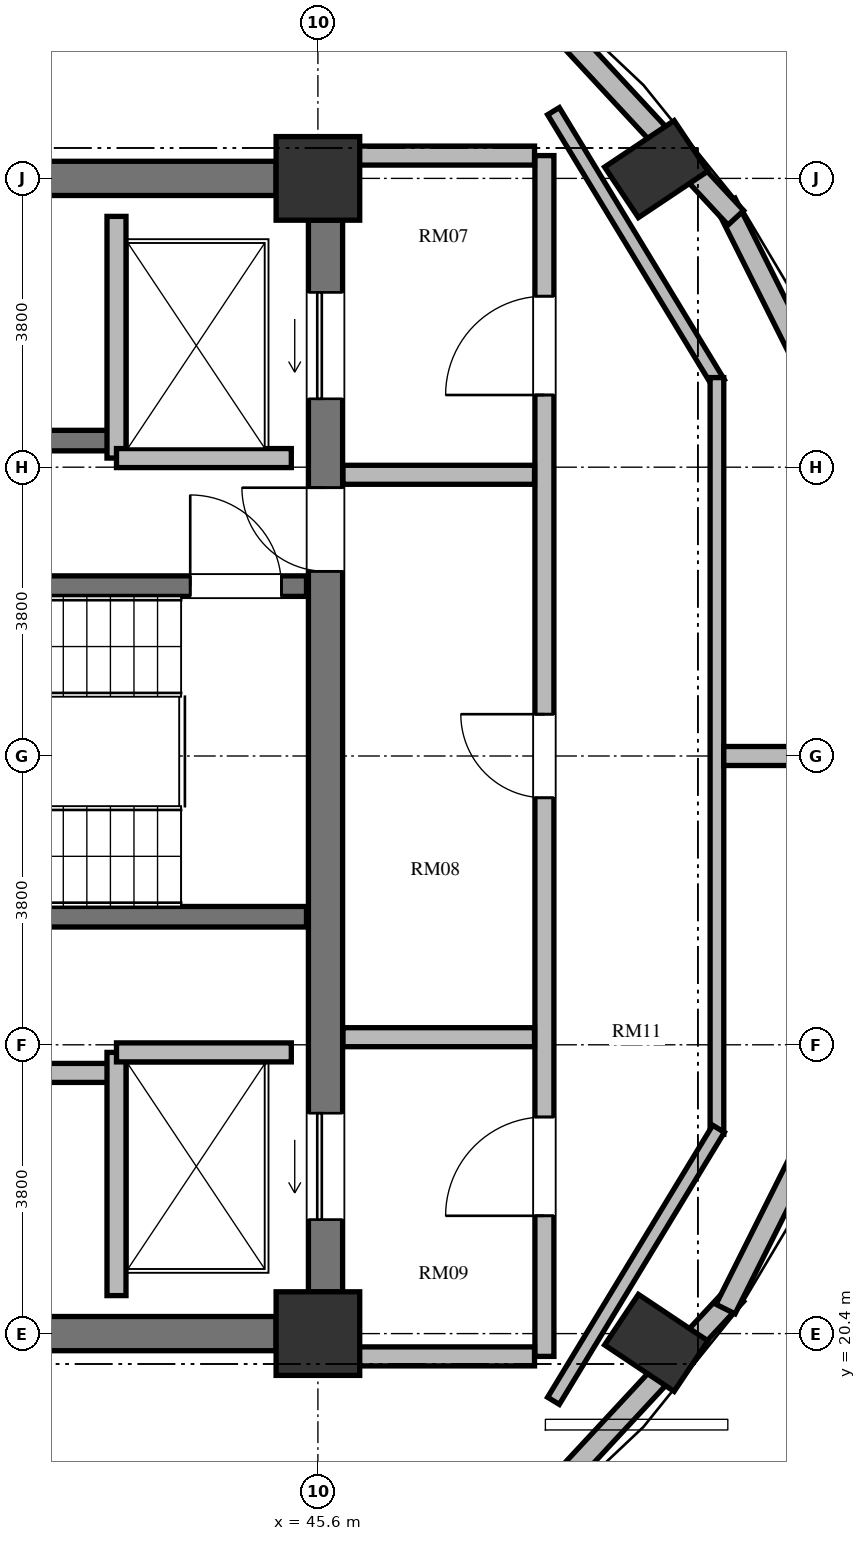
"""IFC4 building model, lengths in metres.
Left out: names, types, materials, properties, quantities, classifications, styles, units other than length and angle.
Written with IfcOpenShell. Run it as: python <this file> out.ifc"""

import sys

from ifc_helpers import new_model, si_unit, direction, frame, frame_2d, origin, origin_2d, place, context, subcontext, project, spatial, rectangle, extrude, element, fill, save


model = new_model("IFC4")
c1 = context("Model", 3, precision=1e-05, world=origin(), true_north=direction((0.0, 1.0)))
c2 = subcontext(c1, "Body", "Model", "MODEL_VIEW")
j1 = project(units=[si_unit("LENGTHUNIT", "METRE"), si_unit("PLANEANGLEUNIT", "RADIAN")], contexts=[c1])
p1 = place(None, origin())
s1 = spatial("IfcSite", under=j1, at=p1, CompositionType="ELEMENT")
p2 = place(p1, origin())
s2 = spatial("IfcBuilding", under=s1, at=p2, CompositionType="ELEMENT")
p3 = place(p2, frame((0.0, 0.0, 305.836)))
s3 = spatial("IfcBuildingStorey", under=s2, at=p3, CompositionType="ELEMENT", Elevation=305.836)
for number, where, z_axis, x_axis in (
    (1, (50.052, 20.278, 0.0), (0.0, 0.0, 1.0), (0.831, -0.556, 0.0)),
    (2, (50.052, 35.722, 0.0), (0.0, 0.0, 1.0), (0.831, 0.556, 0.0)),
):
    element("IfcColumn", number, at=place(p3, frame(where, z_axis=z_axis, x_axis=x_axis)), inside=s3, PredefinedType="COLUMN", context=c2, shape_type="SweptSolid", body=[
        extrude(rectangle(XDim=1.1, YDim=0.8, at=origin_2d()), origin(), (0.0, 0.0, 1.0), 3.388),
    ])
for number, where, z_axis, x_axis in (
    (3, (45.6, 20.4, 0.0), (0.0, 0.0, 1.0), (1.0, 0.0, 0.0)),
    (4, (45.6, 35.6, 0.0), (0.0, 0.0, 1.0), (1.0, 0.0, 0.0)),
):
    element("IfcColumn", number, at=place(p3, frame(where, z_axis=z_axis, x_axis=x_axis)), inside=s3, PredefinedType="COLUMN", context=c2, shape_type="SweptSolid", body=[
        extrude(rectangle(XDim=1.1, YDim=1.1, at=origin_2d()), origin(), (0.0, 0.0, 1.0), 3.388),
    ])
p4 = place(p3, frame((45.7, 20.95, 0.0), z_axis=(0.0, 0.0, 1.0), x_axis=(0.0, 1.0, 0.0)))
e5 = element("IfcWall", 5, at=p4, inside=s3, PredefinedType="SHEAR", context=c2, shape_type="SweptSolid", body=[
    extrude(rectangle(XDim=14.1, YDim=0.45, at=frame_2d((7.05, 0.0))), origin(), (0.0, 0.0, 1.0), 3.388),
])
p5 = place(p4, frame((11.75, 0.0, 0.0)))
e6 = element("IfcOpeningElement", 6, at=p5, cuts=e5, PredefinedType="OPENING", context=c2, shape_type="SweptSolid", body=[
    extrude(rectangle(XDim=1.4, YDim=2.3, at=frame_2d((0.7, 1.15))), frame((0.0, 0.235, 0.0), z_axis=(0.0, -1.0, 0.0), x_axis=(1.0, 0.0, 0.0)), (0.0, 0.0, 1.0), 0.47),
])
p6 = place(p4, frame((0.95, 0.0, 0.0)))
e7 = element("IfcOpeningElement", 7, at=p6, cuts=e5, PredefinedType="OPENING", context=c2, shape_type="SweptSolid", body=[
    extrude(rectangle(XDim=1.4, YDim=2.3, at=frame_2d((0.7, 1.15))), frame((0.0, 0.235, 0.0), z_axis=(0.0, -1.0, 0.0), x_axis=(1.0, 0.0, 0.0)), (0.0, 0.0, 1.0), 0.47),
])
p7 = place(p4, frame((9.48, 0.0, 0.0)))
e8 = element("IfcOpeningElement", 8, at=p7, cuts=e5, PredefinedType="OPENING", context=c2, shape_type="SweptSolid", body=[
    extrude(rectangle(XDim=1.1, YDim=2.15, at=frame_2d((0.55, 1.075))), frame((0.0, 0.235, 0.0), z_axis=(0.0, -1.0, 0.0), x_axis=(1.0, 0.0, 0.0)), (0.0, 0.0, 1.0), 0.47),
])
for number, where, z_axis, x_axis in (
    (9, (39.6, 20.4, 0.0), (0.0, 0.0, 1.0), (1.0, 0.0, 0.0)),
    (10, (39.6, 35.6, 0.0), (0.0, 0.0, 1.0), (1.0, 0.0, 0.0)),
):
    element("IfcWall", number, at=place(p3, frame(where, z_axis=z_axis, x_axis=x_axis)), inside=s3, PredefinedType="SHEAR", context=c2, shape_type="SweptSolid", body=[
        extrude(rectangle(XDim=5.45, YDim=0.45, at=frame_2d((2.725, 0.0))), origin(), (0.0, 0.0, 1.0), 3.388),
    ])
p8 = place(p3, frame((48.18, 17.772, 0.0), z_axis=(0.0, 0.0, 1.0), x_axis=(0.680156447476, 0.733066986678, 0.0)))
e11 = element("IfcWall", 11, at=p8, inside=s3, PredefinedType="SOLIDWALL", context=c2, shape_type="SweptSolid", body=[
    extrude(rectangle(XDim=4.291, YDim=0.28, at=frame_2d((2.146, 0.0))), origin(), (0.0, 0.0, 1.0), 3.068),
])
for number, where, z_axis, x_axis in (
    (12, (50.963, 20.723, 0.0), (0.0, 0.0, 1.0), (0.448, 0.894, 0.0)),
    (13, (52.803, 31.604, 0.0), (0.0, 0.0, 1.0), (-0.448, 0.894, 0.0)),
):
    element("IfcWall", number, at=place(p3, frame(where, z_axis=z_axis, x_axis=x_axis)), inside=s3, PredefinedType="SOLIDWALL", context=c2, shape_type="SweptSolid", body=[
        extrude(rectangle(XDim=4.108, YDim=0.28, at=frame_2d((2.054, 0.0))), origin(), (0.0, 0.0, 1.0), 3.068),
    ])
p9 = place(p3, frame((51.098, 35.082, 0.0), z_axis=(0.0, 0.0, 1.0), x_axis=(-0.680156447476, 0.733066986678, 0.0)))
e14 = element("IfcWall", 14, at=p9, inside=s3, PredefinedType="SOLIDWALL", context=c2, shape_type="SweptSolid", body=[
    extrude(rectangle(XDim=4.291, YDim=0.28, at=frame_2d((2.146, 0.0))), origin(), (0.0, 0.0, 1.0), 3.068),
])
p10 = place(p3, frame((37.465, 30.235, 0.0), z_axis=(0.0, 0.0, 1.0), x_axis=(1.0, 0.0, 0.0)))
e15 = element("IfcWall", 15, at=p10, inside=s3, PredefinedType="SHEAR", context=c2, shape_type="SweptSolid", body=[
    extrude(rectangle(XDim=7.985, YDim=0.27, at=frame_2d((3.992, 0.0))), origin(), (0.0, 0.0, 1.0), 3.388),
])
p11 = place(p10, frame((6.455, 0.0, 0.0)))
e16 = element("IfcOpeningElement", 16, at=p11, cuts=e15, PredefinedType="OPENING", context=c2, shape_type="SweptSolid", body=[
    extrude(rectangle(XDim=1.2, YDim=2.15, at=frame_2d((0.6, 1.075))), frame((0.0, 0.145, 0.0), z_axis=(0.0, -1.0, 0.0), x_axis=(1.0, 0.0, 0.0)), (0.0, 0.0, 1.0), 0.29),
])
p12 = place(p3, frame((37.465, 25.885, 0.0), z_axis=(0.0, 0.0, 1.0), x_axis=(1.0, 0.0, 0.0)))
e17 = element("IfcWall", 17, at=p12, inside=s3, PredefinedType="SHEAR", context=c2, shape_type="SweptSolid", body=[
    extrude(rectangle(XDim=7.985, YDim=0.27, at=frame_2d((3.992, 0.0))), origin(), (0.0, 0.0, 1.0), 3.388),
])
p13 = place(p3, frame((26.55, 32.15, 0.0), z_axis=(0.0, 0.0, 1.0), x_axis=(1.0, 0.0, 0.0)))
e18 = element("IfcWall", 18, at=p13, inside=s3, PredefinedType="SHEAR", context=c2, shape_type="SweptSolid", body=[
    extrude(rectangle(XDim=16.4, YDim=0.27, at=frame_2d((8.2, 0.0))), origin(), (0.0, 0.0, 1.0), 3.388),
])
p14 = place(p13, frame((4.9, 0.0, 0.0)))
e19 = element("IfcOpeningElement", 19, at=p14, cuts=e18, PredefinedType="OPENING", context=c2, shape_type="SweptSolid", body=[
    extrude(rectangle(XDim=1.1, YDim=2.15, at=frame_2d((0.55, 1.075))), frame((0.0, 0.145, 0.0), z_axis=(0.0, -1.0, 0.0), x_axis=(1.0, 0.0, 0.0)), (0.0, 0.0, 1.0), 0.29),
])
p15 = place(p13, frame((11.9, 0.0, 0.0)))
e20 = element("IfcOpeningElement", 20, at=p15, cuts=e18, PredefinedType="OPENING", context=c2, shape_type="SweptSolid", body=[
    extrude(rectangle(XDim=1.1, YDim=2.2, at=frame_2d((0.55, 1.1))), frame((0.0, 0.145, 0.0), z_axis=(0.0, -1.0, 0.0), x_axis=(1.0, 0.0, 0.0)), (0.0, 0.0, 1.0), 0.29),
])
p16 = place(p3, frame((26.75, 23.83, 0.0), z_axis=(0.0, 0.0, 1.0), x_axis=(1.0, 0.0, 0.0)))
e21 = element("IfcWall", 21, at=p16, inside=s3, PredefinedType="SOLIDWALL", context=c2, shape_type="SweptSolid", body=[
    extrude(rectangle(XDim=16.2, YDim=0.25, at=frame_2d((8.1, 0.0))), origin(), (0.0, 0.0, 1.0), 3.068),
])
p17 = place(p16, frame((7.7, 0.0, 0.0)))
e22 = element("IfcOpeningElement", 22, at=p17, cuts=e21, PredefinedType="OPENING", context=c2, shape_type="SweptSolid", body=[
    extrude(rectangle(XDim=1.1, YDim=2.15, at=frame_2d((0.55, 1.075))), frame((0.0, 0.135, 0.0), z_axis=(0.0, -1.0, 0.0), x_axis=(1.0, 0.0, 0.0)), (0.0, 0.0, 1.0), 0.27),
])
p18 = place(p3, frame((42.95, 31.92, 0.0), z_axis=(0.0, 0.0, 1.0), x_axis=(0.0, 1.0, 0.0)))
e23 = element("IfcWall", 23, at=p18, inside=s3, PredefinedType="SOLIDWALL", context=c2, shape_type="SweptSolid", body=[
    extrude(rectangle(XDim=3.18, YDim=0.25, at=frame_2d((1.59, 0.0))), origin(), (0.0, 0.0, 1.0), 3.068),
])
p19 = place(p3, frame((42.95, 31.92, 0.0), z_axis=(0.0, 0.0, 1.0), x_axis=(1.0, 0.0, 0.0)))
e24 = element("IfcWall", 24, at=p19, inside=s3, PredefinedType="SOLIDWALL", context=c2, shape_type="SweptSolid", body=[
    extrude(rectangle(XDim=2.3, YDim=0.25, at=frame_2d((1.15, 0.0))), origin(), (0.0, 0.0, 1.0), 3.068),
])
p20 = place(p3, frame((42.95, 20.9, 0.0), z_axis=(0.0, 0.0, 1.0), x_axis=(0.0, 1.0, 0.0)))
e25 = element("IfcWall", 25, at=p20, inside=s3, PredefinedType="SOLIDWALL", context=c2, shape_type="SweptSolid", body=[
    extrude(rectangle(XDim=3.2, YDim=0.25, at=frame_2d((1.6, 0.0))), origin(), (0.0, 0.0, 1.0), 3.068),
])
p21 = place(p3, frame((42.95, 24.1, 0.0), z_axis=(0.0, 0.0, 1.0), x_axis=(1.0, 0.0, 0.0)))
e26 = element("IfcWall", 26, at=p21, inside=s3, PredefinedType="SOLIDWALL", context=c2, shape_type="SweptSolid", body=[
    extrude(rectangle(XDim=2.3, YDim=0.25, at=frame_2d((1.15, 0.0))), origin(), (0.0, 0.0, 1.0), 3.068),
])
p22 = place(p3, frame((48.58, 20.1, 0.0), z_axis=(0.0, 0.0, 1.0), x_axis=(0.0, 1.0, 0.0)))
e27 = element("IfcWall", 27, at=p22, inside=s3, PredefinedType="SOLIDWALL", context=c2, shape_type="SweptSolid", body=[
    extrude(rectangle(XDim=15.8, YDim=0.25, at=frame_2d((7.9, 0.0))), origin(), (0.0, 0.0, 1.0), 3.068),
])
p23 = place(p22, frame((12.65, 0.0, 0.0)))
e28 = element("IfcOpeningElement", 28, at=p23, cuts=e27, PredefinedType="OPENING", context=c2, shape_type="SweptSolid", body=[
    extrude(rectangle(XDim=1.3, YDim=2.2, at=frame_2d((0.65, 1.1))), frame((0.0, 0.135, 0.0), z_axis=(0.0, -1.0, 0.0), x_axis=(1.0, 0.0, 0.0)), (0.0, 0.0, 1.0), 0.27),
])
p24 = place(p22, frame((7.35, 0.0, 0.0)))
e29 = element("IfcOpeningElement", 29, at=p24, cuts=e27, PredefinedType="OPENING", context=c2, shape_type="SweptSolid", body=[
    extrude(rectangle(XDim=1.1, YDim=2.15, at=frame_2d((0.55, 1.075))), frame((0.0, 0.135, 0.0), z_axis=(0.0, -1.0, 0.0), x_axis=(1.0, 0.0, 0.0)), (0.0, 0.0, 1.0), 0.27),
])
p25 = place(p22, frame((1.85, 0.0, 0.0)))
e30 = element("IfcOpeningElement", 30, at=p25, cuts=e27, PredefinedType="OPENING", context=c2, shape_type="SweptSolid", body=[
    extrude(rectangle(XDim=1.3, YDim=2.2, at=frame_2d((0.65, 1.1))), frame((0.0, 0.135, 0.0), z_axis=(0.0, -1.0, 0.0), x_axis=(1.0, 0.0, 0.0)), (0.0, 0.0, 1.0), 0.27),
])
for number, where, z_axis, x_axis in (
    (31, (45.93, 35.9, 0.0), (0.0, 0.0, 1.0), (1.0, 0.0, 0.0)),
    (32, (45.93, 31.7, 0.0), (0.0, 0.0, 1.0), (1.0, 0.0, 0.0)),
    (33, (45.93, 24.3, 0.0), (0.0, 0.0, 1.0), (1.0, 0.0, 0.0)),
    (34, (45.93, 20.1, 0.0), (0.0, 0.0, 1.0), (1.0, 0.0, 0.0)),
):
    element("IfcWall", number, at=place(p3, frame(where, z_axis=z_axis, x_axis=x_axis)), inside=s3, PredefinedType="SOLIDWALL", context=c2, shape_type="SweptSolid", body=[
        extrude(rectangle(XDim=2.52, YDim=0.25, at=frame_2d((1.26, 0.0))), origin(), (0.0, 0.0, 1.0), 3.068),
    ])
p26 = place(p3, frame((48.699, 36.485, 0.0), z_axis=(0.0, 0.0, 1.0), x_axis=(0.518614420457, -0.855008235571, 0.0)))
e35 = element("IfcWall", 35, at=p26, inside=s3, PredefinedType="PARTITIONING", context=c2, shape_type="SweptSolid", body=[
    extrude(rectangle(XDim=4.187, YDim=0.18, at=frame_2d((2.094, 0.0))), origin(), (0.0, 0.0, 1.0), 3.068),
])
p27 = place(p3, frame((50.85, 32.979, 0.0), z_axis=(0.0, 0.0, 1.0), x_axis=(0.0, -1.0, 0.0)))
e36 = element("IfcWall", 36, at=p27, inside=s3, PredefinedType="PARTITIONING", context=c2, shape_type="SweptSolid", body=[
    extrude(rectangle(XDim=9.958, YDim=0.18, at=frame_2d((4.979, 0.0))), origin(), (0.0, 0.0, 1.0), 3.068),
])
p28 = place(p3, frame((50.871, 23.095, 0.0), z_axis=(0.0, 0.0, 1.0), x_axis=(-0.518614420457, -0.855008235571, 0.0)))
e37 = element("IfcWall", 37, at=p28, inside=s3, PredefinedType="PARTITIONING", context=c2, shape_type="SweptSolid", body=[
    extrude(rectangle(XDim=4.187, YDim=0.18, at=frame_2d((2.094, 0.0))), origin(), (0.0, 0.0, 1.0), 3.068),
])
p29 = place(p3, frame((50.94, 28.0, 0.0), z_axis=(0.0, 0.0, 1.0), x_axis=(1.0, 0.0, 0.0)))
e38 = element("IfcWall", 38, at=p29, inside=s3, PredefinedType="SOLIDWALL", context=c2, shape_type="SweptSolid", body=[
    extrude(rectangle(XDim=2.365, YDim=0.25, at=frame_2d((1.183, 0.0))), origin(), (0.0, 0.0, 1.0), 3.068),
])
p30 = place(p11, origin())
e39 = element("IfcDoor", 39, at=p30, inside=s3, OperationType="SINGLE_SWING_LEFT", PredefinedType="DOOR", context=c2, shape_type="SweptSolid", body=[
    extrude(rectangle(XDim=1.2, YDim=2.15, at=frame_2d((0.6, 1.075))), frame((0.0, 0.025, 0.0), z_axis=(0.0, -1.0, 0.0), x_axis=(1.0, 0.0, 0.0)), (0.0, 0.0, 1.0), 0.05),
])
fill(e16, e39)
p31 = place(p5, origin())
e40 = element("IfcDoor", 40, at=p31, inside=s3, OperationType="SLIDING_TO_LEFT", PredefinedType="DOOR", context=c2, shape_type="SweptSolid", body=[
    extrude(rectangle(XDim=1.4, YDim=2.3, at=frame_2d((0.7, 1.15))), frame((0.0, 0.025, 0.0), z_axis=(0.0, -1.0, 0.0), x_axis=(1.0, 0.0, 0.0)), (0.0, 0.0, 1.0), 0.05),
])
fill(e6, e40)
p32 = place(p6, origin())
e41 = element("IfcDoor", 41, at=p32, inside=s3, OperationType="SLIDING_TO_LEFT", PredefinedType="DOOR", context=c2, shape_type="SweptSolid", body=[
    extrude(rectangle(XDim=1.4, YDim=2.3, at=frame_2d((0.7, 1.15))), frame((0.0, 0.025, 0.0), z_axis=(0.0, -1.0, 0.0), x_axis=(1.0, 0.0, 0.0)), (0.0, 0.0, 1.0), 0.05),
])
fill(e7, e41)
p33 = place(p7, origin())
e42 = element("IfcDoor", 42, at=p33, inside=s3, OperationType="SINGLE_SWING_RIGHT", PredefinedType="DOOR", context=c2, shape_type="SweptSolid", body=[
    extrude(rectangle(XDim=1.1, YDim=2.15, at=frame_2d((0.55, 1.075))), frame((0.0, 0.025, 0.0), z_axis=(0.0, -1.0, 0.0), x_axis=(1.0, 0.0, 0.0)), (0.0, 0.0, 1.0), 0.05),
])
fill(e8, e42)
p34 = place(p23, origin())
e43 = element("IfcDoor", 43, at=p34, inside=s3, OperationType="SINGLE_SWING_LEFT", PredefinedType="DOOR", context=c2, shape_type="SweptSolid", body=[
    extrude(rectangle(XDim=1.3, YDim=2.2, at=frame_2d((0.65, 1.1))), frame((0.0, 0.025, 0.0), z_axis=(0.0, -1.0, 0.0), x_axis=(1.0, 0.0, 0.0)), (0.0, 0.0, 1.0), 0.05),
])
fill(e28, e43)
p35 = place(p24, origin())
e44 = element("IfcDoor", 44, at=p35, inside=s3, OperationType="SINGLE_SWING_RIGHT", PredefinedType="DOOR", context=c2, shape_type="SweptSolid", body=[
    extrude(rectangle(XDim=1.1, YDim=2.15, at=frame_2d((0.55, 1.075))), frame((0.0, 0.025, 0.0), z_axis=(0.0, -1.0, 0.0), x_axis=(1.0, 0.0, 0.0)), (0.0, 0.0, 1.0), 0.05),
])
fill(e29, e44)
p36 = place(p25, origin())
e45 = element("IfcDoor", 45, at=p36, inside=s3, OperationType="SINGLE_SWING_LEFT", PredefinedType="DOOR", context=c2, shape_type="SweptSolid", body=[
    extrude(rectangle(XDim=1.3, YDim=2.2, at=frame_2d((0.65, 1.1))), frame((0.0, 0.025, 0.0), z_axis=(0.0, -1.0, 0.0), x_axis=(1.0, 0.0, 0.0)), (0.0, 0.0, 1.0), 0.05),
])
fill(e30, e45)
save(model, sys.argv[1])
